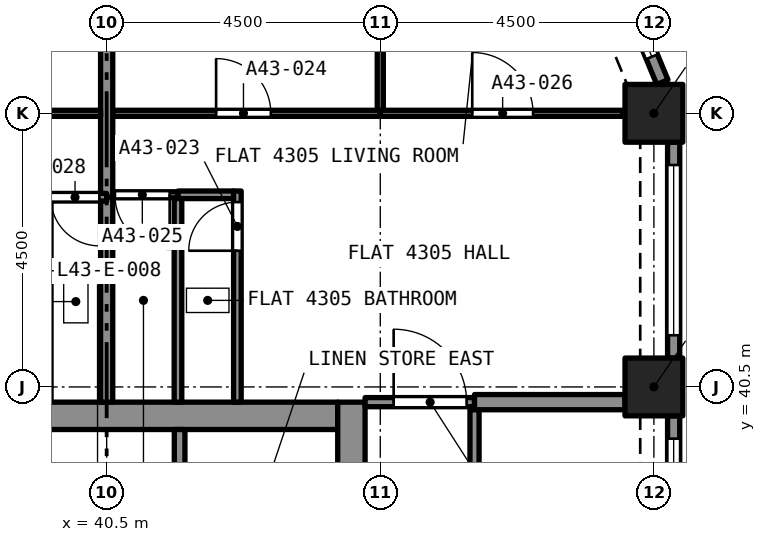
"""IFC4 building model, lengths in metres.
Left out: names, types, materials, properties, quantities, classifications, styles, units other than length and angle.
Written with IfcOpenShell. Run it as: python <this file> out.ifc"""

import sys

from ifc_helpers import new_model, si_unit, direction, frame, frame_2d, origin, origin_2d, place, context, subcontext, project, spatial, rectangle, extrude, element, fill, save


model = new_model("IFC4")
c1 = context("Model", 3, precision=1e-05, world=origin(), true_north=direction((0.0, 1.0)))
c2 = subcontext(c1, "Body", "Model", "MODEL_VIEW")
j1 = project(units=[si_unit("LENGTHUNIT", "METRE"), si_unit("PLANEANGLEUNIT", "RADIAN")], contexts=[c1])
p1 = place(None, origin())
s1 = spatial("IfcSite", under=j1, at=p1, CompositionType="ELEMENT")
p2 = place(p1, origin())
s2 = spatial("IfcBuilding", under=s1, at=p2, CompositionType="ELEMENT")
p3 = place(p2, frame((0.0, 0.0, 155.0)))
s3 = spatial("IfcBuildingStorey", under=s2, at=p3, CompositionType="ELEMENT", Elevation=155.0)
for number, where, z_axis, x_axis in (
    (1, (49.5, 40.5, 0.0), (0.0, 0.0, 1.0), (1.0, 0.0, 0.0)),
    (2, (49.5, 45.0, 0.0), (0.0, 0.0, 1.0), (1.0, 0.0, 0.0)),
):
    element("IfcColumn", number, at=place(p3, frame(where, z_axis=z_axis, x_axis=x_axis)), inside=s3, PredefinedType="COLUMN", context=c2, shape_type="SweptSolid", body=[
        extrude(rectangle(XDim=0.95, YDim=0.95, at=origin_2d()), origin(), (0.0, 0.0, 1.0), 4.4),
    ])
p4 = place(p3, frame((36.7, 40.025, 0.0), z_axis=(0.0, 0.0, 1.0), x_axis=(1.0, 0.0, 0.0)))
e3 = element("IfcWall", 3, at=p4, inside=s3, PredefinedType="SOLIDWALL", context=c2, shape_type="SweptSolid", body=[
    extrude(rectangle(XDim=7.6, YDim=0.45, at=frame_2d((3.8, 0.0))), origin(), (0.0, 0.0, 1.0), 4.4),
])
p5 = place(p3, frame((44.525, 27.25, 0.0), z_axis=(0.0, 0.0, 1.0), x_axis=(0.0, 1.0, 0.0)))
e4 = element("IfcWall", 4, at=p5, inside=s3, PredefinedType="SOLIDWALL", context=c2, shape_type="SweptSolid", body=[
    extrude(rectangle(XDim=13.0, YDim=0.45, at=frame_2d((6.5, 0.0))), origin(), (0.0, 0.0, 1.0), 4.4),
])
p6 = place(p5, frame((8.7, 0.0, 0.0)))
e5 = element("IfcOpeningElement", 5, at=p6, cuts=e4, PredefinedType="OPENING", context=c2, shape_type="SweptSolid", body=[
    extrude(rectangle(XDim=1.2, YDim=2.1, at=frame_2d((0.6, 1.05))), frame((0.0, 0.235, 0.0), z_axis=(0.0, -1.0, 0.0), x_axis=(1.0, 0.0, 0.0)), (0.0, 0.0, 1.0), 0.47),
])
p7 = place(p3, frame((49.825, 40.025, 0.0), z_axis=(0.0, 0.0, 1.0), x_axis=(0.0, -1.0, 0.0)))
e6 = element("IfcWall", 6, at=p7, inside=s3, PredefinedType="SOLIDWALL", context=c2, shape_type="SweptSolid", body=[
    extrude(rectangle(XDim=3.55, YDim=0.2, at=frame_2d((1.775, 0.0))), origin(), (0.0, 0.0, 1.0), 4.4),
])
p8 = place(p7, frame((0.375, 0.0, 0.45)))
e7 = element("IfcOpeningElement", 7, at=p8, cuts=e6, PredefinedType="OPENING", context=c2, shape_type="SweptSolid", body=[
    extrude(rectangle(XDim=2.8, YDim=2.55, at=frame_2d((1.4, 1.275))), frame((0.0, 0.11, 0.0), z_axis=(0.0, -1.0, 0.0), x_axis=(1.0, 0.0, 0.0)), (0.0, 0.0, 1.0), 0.22),
])
p9 = place(p3, frame((49.825, 44.525, 0.0), z_axis=(0.0, 0.0, 1.0), x_axis=(0.0, -1.0, 0.0)))
e8 = element("IfcWall", 8, at=p9, inside=s3, PredefinedType="SOLIDWALL", context=c2, shape_type="SweptSolid", body=[
    extrude(rectangle(XDim=3.55, YDim=0.2, at=frame_2d((1.775, 0.0))), origin(), (0.0, 0.0, 1.0), 4.4),
])
p10 = place(p9, frame((0.375, 0.0, 0.45)))
e9 = element("IfcOpeningElement", 9, at=p10, cuts=e8, PredefinedType="OPENING", context=c2, shape_type="SweptSolid", body=[
    extrude(rectangle(XDim=2.8, YDim=2.55, at=frame_2d((1.4, 1.275))), frame((0.0, 0.11, 0.0), z_axis=(0.0, -1.0, 0.0), x_axis=(1.0, 0.0, 0.0)), (0.0, 0.0, 1.0), 0.22),
])
p11 = place(p3, frame((48.72, 47.733, 0.0), z_axis=(0.0, 0.0, 1.0), x_axis=(0.382680855588, -0.923880599843, 0.0)))
e10 = element("IfcWall", 10, at=p11, inside=s3, PredefinedType="SOLIDWALL", context=c2, shape_type="SweptSolid", body=[
    extrude(rectangle(XDim=2.403, YDim=0.2, at=frame_2d((1.201, 0.0))), origin(), (0.0, 0.0, 1.0), 4.4),
])
p12 = place(p11, frame((0.251, 0.0, 0.45)))
e11 = element("IfcOpeningElement", 11, at=p12, cuts=e10, PredefinedType="OPENING", context=c2, shape_type="SweptSolid", body=[
    extrude(rectangle(XDim=1.7, YDim=2.55, at=frame_2d((0.85, 1.275))), frame((0.0, 0.11, 0.0), z_axis=(0.0, -1.0, 0.0), x_axis=(1.0, 0.0, 0.0)), (0.0, 0.0, 1.0), 0.22),
])
p13 = place(p3, frame((41.673, 43.66, 0.0), z_axis=(0.0, 0.0, 1.0), x_axis=(1.0, 0.0, 0.0)))
e12 = element("IfcWall", 12, at=p13, inside=s3, PredefinedType="PARTITIONING", context=c2, shape_type="SweptSolid", body=[
    extrude(rectangle(XDim=0.915, YDim=0.125, at=frame_2d((0.458, 0.0))), origin(), (0.0, 0.0, 1.0), 4.1),
])
p14 = place(p3, frame((42.65, 40.25, 0.0), z_axis=(0.0, 0.0, 1.0), x_axis=(0.0, 1.0, 0.0)))
e13 = element("IfcWall", 13, at=p14, inside=s3, PredefinedType="PARTITIONING", context=c2, shape_type="SweptSolid", body=[
    extrude(rectangle(XDim=3.472, YDim=0.125, at=frame_2d((1.736, 0.0))), origin(), (0.0, 0.0, 1.0), 4.1),
])
p15 = place(p14, frame((2.49, 0.0, 0.0)))
e14 = element("IfcOpeningElement", 14, at=p15, cuts=e13, PredefinedType="OPENING", context=c2, shape_type="SweptSolid", body=[
    extrude(rectangle(XDim=0.8, YDim=2.1, at=frame_2d((0.4, 1.05))), frame((0.0, 0.073, 0.0), z_axis=(0.0, -1.0, 0.0), x_axis=(1.0, 0.0, 0.0)), (0.0, 0.0, 1.0), 0.145),
])
p16 = place(p3, frame((41.673, 40.25, 0.0), z_axis=(0.0, 0.0, 1.0), x_axis=(0.0, 1.0, 0.0)))
e15 = element("IfcWall", 15, at=p16, inside=s3, PredefinedType="PARTITIONING", context=c2, shape_type="SweptSolid", body=[
    extrude(rectangle(XDim=3.347, YDim=0.125, at=frame_2d((1.674, 0.0))), origin(), (0.0, 0.0, 1.0), 4.1),
])
p17 = place(p3, frame((40.6, 45.0, 0.0), z_axis=(0.0, 0.0, 1.0), x_axis=(1.0, 0.0, 0.0)))
e16 = element("IfcWall", 16, at=p17, inside=s3, PredefinedType="PARTITIONING", context=c2, shape_type="SweptSolid", body=[
    extrude(rectangle(XDim=4.4, YDim=0.1, at=frame_2d((2.2, 0.0))), origin(), (0.0, 0.0, 1.0), 4.1),
])
p18 = place(p17, frame((1.7, 0.0, 0.0)))
e17 = element("IfcOpeningElement", 17, at=p18, cuts=e16, PredefinedType="OPENING", context=c2, shape_type="SweptSolid", body=[
    extrude(rectangle(XDim=0.9, YDim=2.1, at=frame_2d((0.45, 1.05))), frame((0.0, 0.06, 0.0), z_axis=(0.0, -1.0, 0.0), x_axis=(1.0, 0.0, 0.0)), (0.0, 0.0, 1.0), 0.12),
])
p19 = place(p3, frame((45.0, 45.05, 0.0), z_axis=(0.0, 0.0, 1.0), x_axis=(0.0, 1.0, 0.0)))
e18 = element("IfcWall", 18, at=p19, inside=s3, PredefinedType="PARTITIONING", context=c2, shape_type="SweptSolid", body=[
    extrude(rectangle(XDim=3.936, YDim=0.1, at=frame_2d((1.968, 0.0))), origin(), (0.0, 0.0, 1.0), 4.1),
])
p20 = place(p3, frame((41.673, 43.66, 0.0), z_axis=(0.0, 0.0, 1.0), x_axis=(-1.0, 0.0, 0.0)))
e19 = element("IfcWall", 19, at=p20, inside=s3, PredefinedType="PARTITIONING", context=c2, shape_type="SweptSolid", body=[
    extrude(rectangle(XDim=1.073, YDim=0.1, at=frame_2d((0.536, 0.0))), origin(), (0.0, 0.0, 1.0), 4.1),
])
p21 = place(p20, frame((0.136, 0.0, 0.0)))
e20 = element("IfcOpeningElement", 20, at=p21, cuts=e19, PredefinedType="OPENING", context=c2, shape_type="SweptSolid", body=[
    extrude(rectangle(XDim=0.9, YDim=2.1, at=frame_2d((0.45, 1.05))), frame((0.0, 0.06, 0.0), z_axis=(0.0, -1.0, 0.0), x_axis=(1.0, 0.0, 0.0)), (0.0, 0.0, 1.0), 0.12),
])
p22 = place(p3, frame((45.0, 45.0, 0.0), z_axis=(0.0, 0.0, 1.0), x_axis=(1.0, 0.0, 0.0)))
e21 = element("IfcWall", 21, at=p22, inside=s3, PredefinedType="PARTITIONING", context=c2, shape_type="SweptSolid", body=[
    extrude(rectangle(XDim=3.986, YDim=0.1, at=frame_2d((1.993, 0.0))), origin(), (0.0, 0.0, 1.0), 4.1),
])
p23 = place(p22, frame((1.512, 0.0, 0.0)))
e22 = element("IfcOpeningElement", 22, at=p23, cuts=e21, PredefinedType="OPENING", context=c2, shape_type="SweptSolid", body=[
    extrude(rectangle(XDim=1.0, YDim=2.1, at=frame_2d((0.5, 1.05))), frame((0.0, 0.06, 0.0), z_axis=(0.0, -1.0, 0.0), x_axis=(1.0, 0.0, 0.0)), (0.0, 0.0, 1.0), 0.12),
])
p24 = place(p3, frame((40.5, 43.61, 0.0), z_axis=(0.0, 0.0, 1.0), x_axis=(0.0, 1.0, 0.0)))
e23 = element("IfcWall", 23, at=p24, inside=s3, PredefinedType="PARTITIONING", context=c2, shape_type="SweptSolid", body=[
    extrude(rectangle(XDim=5.415, YDim=0.2, at=frame_2d((2.708, 0.0))), origin(), (0.0, 0.0, 1.0), 4.1),
])
p25 = place(p3, frame((44.75, 40.25, 0.0), z_axis=(0.0, 0.0, 1.0), x_axis=(1.0, 0.0, 0.0)))
e24 = element("IfcWall", 24, at=p25, inside=s3, PredefinedType="PARTITIONING", context=c2, shape_type="SweptSolid", body=[
    extrude(rectangle(XDim=1.8, YDim=0.15, at=frame_2d((0.9, 0.0))), origin(), (0.0, 0.0, 1.0), 4.1),
])
p26 = place(p25, frame((0.47, 0.0, 0.0)))
e25 = element("IfcOpeningElement", 25, at=p26, cuts=e24, PredefinedType="OPENING", context=c2, shape_type="SweptSolid", body=[
    extrude(rectangle(XDim=1.2, YDim=2.4, at=frame_2d((0.6, 1.2))), frame((0.0, 0.085, 0.0), z_axis=(0.0, -1.0, 0.0), x_axis=(1.0, 0.0, 0.0)), (0.0, 0.0, 1.0), 0.17),
])
p27 = place(p3, frame((46.55, 40.25, 0.0), z_axis=(0.0, 0.0, 1.0), x_axis=(1.0, 0.0, 0.0)))
e26 = element("IfcWall", 26, at=p27, inside=s3, PredefinedType="PARTITIONING", context=c2, shape_type="SweptSolid", body=[
    extrude(rectangle(XDim=2.475, YDim=0.25, at=frame_2d((1.237, 0.0))), origin(), (0.0, 0.0, 1.0), 4.1),
])
p28 = place(p3, frame((40.5, 40.25, 0.0), z_axis=(0.0, 0.0, 1.0), x_axis=(0.0, 1.0, 0.0)))
e27 = element("IfcWall", 27, at=p28, inside=s3, PredefinedType="PARTITIONING", context=c2, shape_type="SweptSolid", body=[
    extrude(rectangle(XDim=3.37, YDim=0.2, at=frame_2d((1.685, 0.0))), origin(), (0.0, 0.0, 1.0), 4.1),
])
p29 = place(p3, frame((40.5, 43.62, 0.0), z_axis=(0.0, 0.0, 1.0), x_axis=(-1.0, 0.0, 0.0)))
e28 = element("IfcWall", 28, at=p29, inside=s3, PredefinedType="PARTITIONING", context=c2, shape_type="SweptSolid", body=[
    extrude(rectangle(XDim=0.977, YDim=0.125, at=frame_2d((0.489, 0.0))), origin(), (0.0, 0.0, 1.0), 4.1),
])
p30 = place(p29, frame((0.12, 0.0, 0.0)))
e29 = element("IfcOpeningElement", 29, at=p30, cuts=e28, PredefinedType="OPENING", context=c2, shape_type="SweptSolid", body=[
    extrude(rectangle(XDim=0.8, YDim=2.1, at=frame_2d((0.4, 1.05))), frame((0.0, 0.073, 0.0), z_axis=(0.0, -1.0, 0.0), x_axis=(1.0, 0.0, 0.0)), (0.0, 0.0, 1.0), 0.145),
])
p31 = place(p3, frame((36.0, 45.0, 0.0), z_axis=(0.0, 0.0, 1.0), x_axis=(1.0, 0.0, 0.0)))
e30 = element("IfcWall", 30, at=p31, inside=s3, PredefinedType="PARTITIONING", context=c2, shape_type="SweptSolid", body=[
    extrude(rectangle(XDim=4.4, YDim=0.1, at=frame_2d((2.2, 0.0))), origin(), (0.0, 0.0, 1.0), 4.1),
])
p32 = place(p31, frame((1.8, 0.0, 0.0)))
e31 = element("IfcOpeningElement", 31, at=p32, cuts=e30, PredefinedType="OPENING", context=c2, shape_type="SweptSolid", body=[
    extrude(rectangle(XDim=0.9, YDim=2.1, at=frame_2d((0.45, 1.05))), frame((0.0, 0.06, 0.0), z_axis=(0.0, -1.0, 0.0), x_axis=(1.0, 0.0, 0.0)), (0.0, 0.0, 1.0), 0.12),
])
p33 = place(p3, frame((46.55, 40.125, 0.0), z_axis=(0.0, 0.0, 1.0), x_axis=(0.0, -1.0, 0.0)))
e32 = element("IfcWall", 32, at=p33, inside=s3, PredefinedType="PARTITIONING", context=c2, shape_type="SweptSolid", body=[
    extrude(rectangle(XDim=12.95, YDim=0.15, at=frame_2d((6.475, 0.0))), origin(), (0.0, 0.0, 1.0), 4.1),
])
p34 = place(p33, frame((5.875, 0.0, 0.0)))
e33 = element("IfcOpeningElement", 33, at=p34, cuts=e32, PredefinedType="OPENING", context=c2, shape_type="SweptSolid", body=[
    extrude(rectangle(XDim=1.0, YDim=2.1, at=frame_2d((0.5, 1.05))), frame((0.0, 0.085, 0.0), z_axis=(0.0, -1.0, 0.0), x_axis=(1.0, 0.0, 0.0)), (0.0, 0.0, 1.0), 0.17),
])
p35 = place(p3, frame((41.7, 37.5, 0.0), z_axis=(0.0, 0.0, 1.0), x_axis=(0.0, 1.0, 0.0)))
e34 = element("IfcWall", 34, at=p35, inside=s3, PredefinedType="SOLIDWALL", context=c2, shape_type="SweptSolid", body=[
    extrude(rectangle(XDim=2.3, YDim=0.175, at=frame_2d((1.15, 0.0))), origin(), (0.0, 0.0, 1.0), 4.1),
])
p36 = place(p8, origin())
e35 = element("IfcWindow", 35, at=p36, inside=s3, PartitioningType="SINGLE_PANEL", PredefinedType="WINDOW", context=c2, shape_type="SweptSolid", body=[
    extrude(rectangle(XDim=2.8, YDim=2.55, at=frame_2d((1.4, 1.275))), frame((0.0, 0.03, 0.0), z_axis=(0.0, -1.0, 0.0), x_axis=(1.0, 0.0, 0.0)), (0.0, 0.0, 1.0), 0.06),
])
fill(e7, e35)
p37 = place(p10, origin())
e36 = element("IfcWindow", 36, at=p37, inside=s3, PartitioningType="SINGLE_PANEL", PredefinedType="WINDOW", context=c2, shape_type="SweptSolid", body=[
    extrude(rectangle(XDim=2.8, YDim=2.55, at=frame_2d((1.4, 1.275))), frame((0.0, 0.03, 0.0), z_axis=(0.0, -1.0, 0.0), x_axis=(1.0, 0.0, 0.0)), (0.0, 0.0, 1.0), 0.06),
])
fill(e9, e36)
p38 = place(p12, origin())
e37 = element("IfcWindow", 37, at=p38, inside=s3, PartitioningType="SINGLE_PANEL", PredefinedType="WINDOW", context=c2, shape_type="SweptSolid", body=[
    extrude(rectangle(XDim=1.7, YDim=2.55, at=frame_2d((0.85, 1.275))), frame((0.0, 0.03, 0.0), z_axis=(0.0, -1.0, 0.0), x_axis=(1.0, 0.0, 0.0)), (0.0, 0.0, 1.0), 0.06),
])
fill(e11, e37)
p39 = place(p15, origin())
e38 = element("IfcDoor", 38, at=p39, inside=s3, OperationType="SINGLE_SWING_RIGHT", PredefinedType="DOOR", context=c2, shape_type="SweptSolid", body=[
    extrude(rectangle(XDim=0.8, YDim=2.1, at=frame_2d((0.4, 1.05))), frame((0.0, 0.025, 0.0), z_axis=(0.0, -1.0, 0.0), x_axis=(1.0, 0.0, 0.0)), (0.0, 0.0, 1.0), 0.05),
])
fill(e14, e38)
p40 = place(p18, origin())
e39 = element("IfcDoor", 39, at=p40, inside=s3, OperationType="SINGLE_SWING_LEFT", PredefinedType="DOOR", context=c2, shape_type="SweptSolid", body=[
    extrude(rectangle(XDim=0.9, YDim=2.1, at=frame_2d((0.45, 1.05))), frame((0.0, 0.025, 0.0), z_axis=(0.0, -1.0, 0.0), x_axis=(1.0, 0.0, 0.0)), (0.0, 0.0, 1.0), 0.05),
])
fill(e17, e39)
p41 = place(p21, origin())
e40 = element("IfcDoor", 40, at=p41, inside=s3, OperationType="SINGLE_SWING_RIGHT", PredefinedType="DOOR", context=c2, shape_type="SweptSolid", body=[
    extrude(rectangle(XDim=0.9, YDim=2.1, at=frame_2d((0.45, 1.05))), frame((0.0, 0.025, 0.0), z_axis=(0.0, -1.0, 0.0), x_axis=(1.0, 0.0, 0.0)), (0.0, 0.0, 1.0), 0.05),
])
fill(e20, e40)
p42 = place(p23, origin())
e41 = element("IfcDoor", 41, at=p42, inside=s3, OperationType="SINGLE_SWING_RIGHT", PredefinedType="DOOR", context=c2, shape_type="SweptSolid", body=[
    extrude(rectangle(XDim=1.0, YDim=2.1, at=frame_2d((0.5, 1.05))), frame((0.0, 0.025, 0.0), z_axis=(0.0, -1.0, 0.0), x_axis=(1.0, 0.0, 0.0)), (0.0, 0.0, 1.0), 0.05),
])
fill(e22, e41)
p43 = place(p26, origin())
e42 = element("IfcDoor", 42, at=p43, inside=s3, OperationType="SINGLE_SWING_RIGHT", PredefinedType="DOOR", context=c2, shape_type="SweptSolid", body=[
    extrude(rectangle(XDim=1.2, YDim=2.4, at=frame_2d((0.6, 1.2))), frame((0.0, 0.025, 0.0), z_axis=(0.0, -1.0, 0.0), x_axis=(1.0, 0.0, 0.0)), (0.0, 0.0, 1.0), 0.05),
])
fill(e25, e42)
p44 = place(p30, origin())
e43 = element("IfcDoor", 43, at=p44, inside=s3, OperationType="SINGLE_SWING_LEFT", PredefinedType="DOOR", context=c2, shape_type="SweptSolid", body=[
    extrude(rectangle(XDim=0.8, YDim=2.1, at=frame_2d((0.4, 1.05))), frame((0.0, 0.025, 0.0), z_axis=(0.0, -1.0, 0.0), x_axis=(1.0, 0.0, 0.0)), (0.0, 0.0, 1.0), 0.05),
])
fill(e29, e43)
save(model, sys.argv[1])
